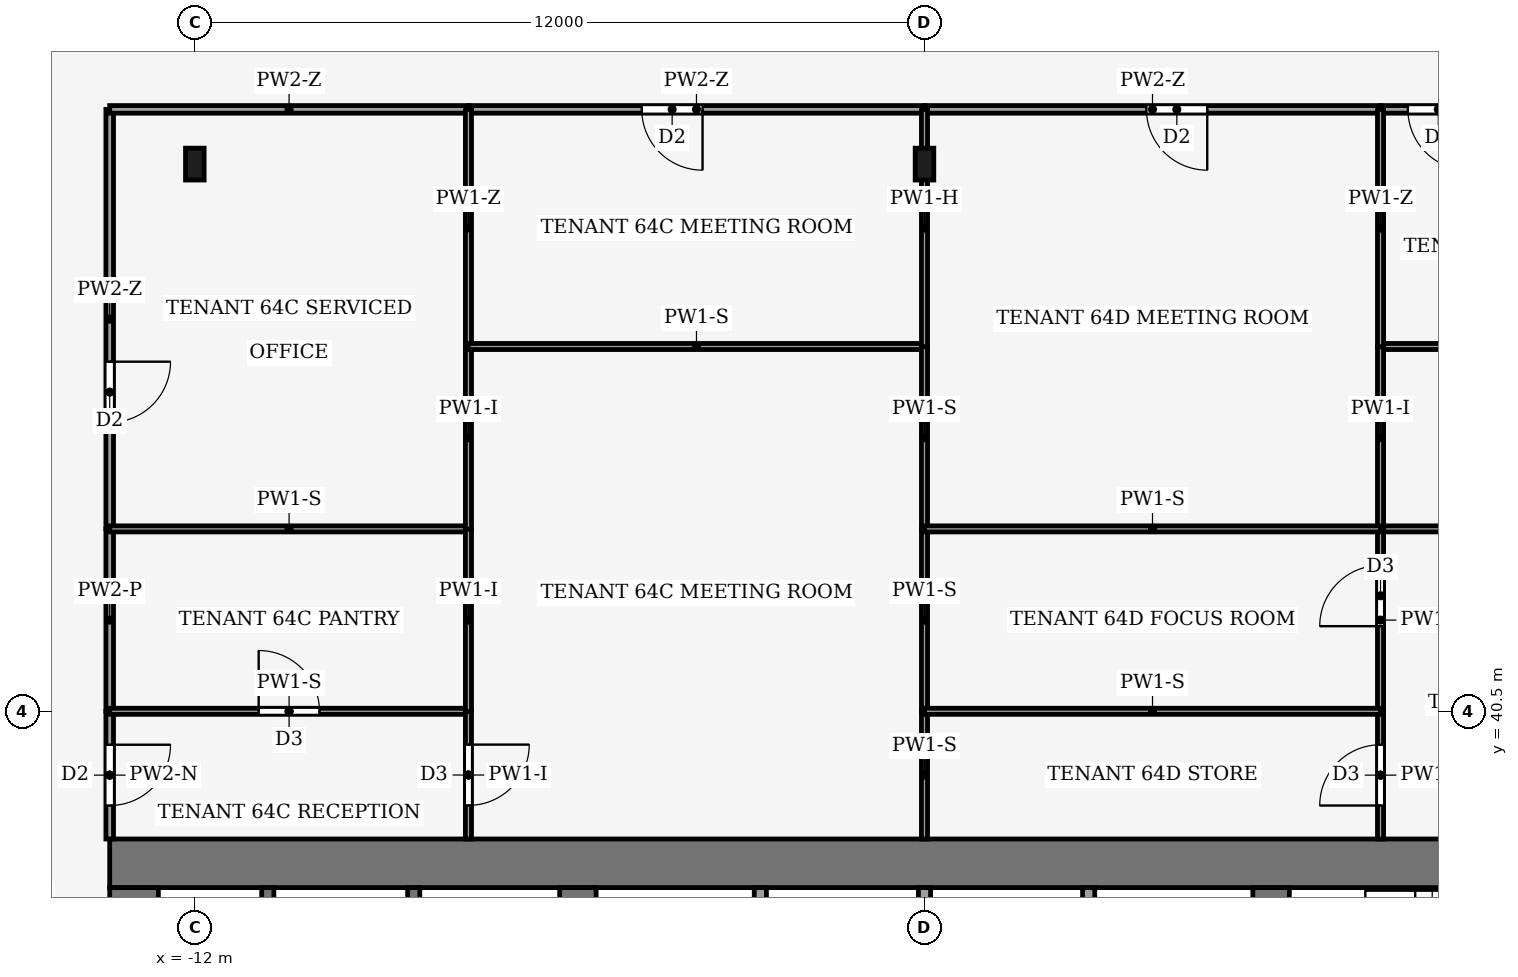
"""IFC4 building model, lengths in metres.
Left out: names, types, materials, properties, quantities, classifications, styles, units other than length and angle.
Written with IfcOpenShell. Run it as: python <this file> out.ifc"""

import sys

from ifc_helpers import new_model, si_unit, direction, frame, frame_2d, origin, origin_2d, place, context, subcontext, project, spatial, rectangle, i_section, extrude, element, fill, save


model = new_model("IFC4")
c1 = context("Model", 3, precision=1e-05, world=origin(), true_north=direction((0.0, 1.0)))
c2 = subcontext(c1, "Body", "Model", "MODEL_VIEW")
j1 = project(units=[si_unit("LENGTHUNIT", "METRE"), si_unit("PLANEANGLEUNIT", "RADIAN")], contexts=[c1])
p1 = place(None, origin())
s1 = spatial("IfcSite", under=j1, at=p1, CompositionType="ELEMENT")
p2 = place(p1, origin())
s2 = spatial("IfcBuilding", under=s1, at=p2, CompositionType="ELEMENT")
p3 = place(p2, frame((0.0, 0.0, 278.0)))
s3 = spatial("IfcBuildingStorey", under=s2, at=p3, CompositionType="ELEMENT", Elevation=278.0)
p4 = place(p3, frame((-13.4, 38.0, -0.13), z_axis=(0.0, 0.0, 1.0), x_axis=(1.0, 0.0, 0.0)))
e1 = element("IfcWall", 1, at=p4, inside=s3, PredefinedType="SHEAR", context=c2, shape_type="SweptSolid", body=[
    extrude(rectangle(XDim=26.8, YDim=0.8, at=frame_2d((13.4, 0.0))), origin(), (0.0, 0.0, 1.0), 3.88),
])
p5 = place(p3, frame((-13.0, 18.4, -0.13), z_axis=(0.0, 0.0, 1.0), x_axis=(0.0, 1.0, 0.0)))
e2 = element("IfcWall", 2, at=p5, inside=s3, PredefinedType="SHEAR", context=c2, shape_type="SweptSolid", body=[
    extrude(rectangle(XDim=19.2, YDim=0.8, at=frame_2d((9.6, 0.0))), origin(), (0.0, 0.0, 1.0), 3.88),
])
p6 = place(p5, frame((2.8, 0.0, 0.13)))
e3 = element("IfcOpeningElement", 3, at=p6, cuts=e2, PredefinedType="OPENING", context=c2, shape_type="SweptSolid", body=[
    extrude(rectangle(XDim=2.4, YDim=2.4, at=frame_2d((1.2, 1.2))), frame((0.0, 0.41, 0.0), z_axis=(0.0, -1.0, 0.0), x_axis=(1.0, 0.0, 0.0)), (0.0, 0.0, 1.0), 0.82),
])
p7 = place(p5, frame((13.4, 0.0, 0.13)))
e4 = element("IfcOpeningElement", 4, at=p7, cuts=e2, PredefinedType="OPENING", context=c2, shape_type="SweptSolid", body=[
    extrude(rectangle(XDim=1.4, YDim=2.2, at=frame_2d((0.7, 1.1))), frame((0.0, 0.41, 0.0), z_axis=(0.0, -1.0, 0.0), x_axis=(1.0, 0.0, 0.0)), (0.0, 0.0, 1.0), 0.82),
])
p8 = place(p3, frame((-5.7, 18.4, -0.13), z_axis=(0.0, 0.0, 1.0), x_axis=(0.0, 1.0, 0.0)))
e5 = element("IfcWall", 5, at=p8, inside=s3, PredefinedType="SHEAR", context=c2, shape_type="SweptSolid", body=[
    extrude(rectangle(XDim=19.2, YDim=0.6, at=frame_2d((9.6, 0.0))), origin(), (0.0, 0.0, 1.0), 3.88),
])
p9 = place(p8, frame((8.35, 0.0, 0.13)))
e6 = element("IfcOpeningElement", 6, at=p9, cuts=e5, PredefinedType="OPENING", context=c2, shape_type="SweptSolid", body=[
    extrude(rectangle(XDim=0.9, YDim=2.1, at=frame_2d((0.45, 1.05))), frame((0.0, 0.31, 0.0), z_axis=(0.0, -1.0, 0.0), x_axis=(1.0, 0.0, 0.0)), (0.0, 0.0, 1.0), 0.62),
])
p10 = place(p3, frame((5.7, 18.4, -0.13), z_axis=(0.0, 0.0, 1.0), x_axis=(0.0, 1.0, 0.0)))
e7 = element("IfcWall", 7, at=p10, inside=s3, PredefinedType="SHEAR", context=c2, shape_type="SweptSolid", body=[
    extrude(rectangle(XDim=19.2, YDim=0.6, at=frame_2d((9.6, 0.0))), origin(), (0.0, 0.0, 1.0), 3.88),
])
p11 = place(p10, frame((8.35, 0.0, 0.13)))
e8 = element("IfcOpeningElement", 8, at=p11, cuts=e7, PredefinedType="OPENING", context=c2, shape_type="SweptSolid", body=[
    extrude(rectangle(XDim=0.9, YDim=2.1, at=frame_2d((0.45, 1.05))), frame((0.0, 0.31, 0.0), z_axis=(0.0, -1.0, 0.0), x_axis=(1.0, 0.0, 0.0)), (0.0, 0.0, 1.0), 0.62),
])
p12 = place(p10, frame((13.3, 0.0, 0.13)))
e9 = element("IfcOpeningElement", 9, at=p12, cuts=e7, PredefinedType="OPENING", context=c2, shape_type="SweptSolid", body=[
    extrude(rectangle(XDim=2.4, YDim=2.4, at=frame_2d((1.2, 1.2))), frame((0.0, 0.31, 0.0), z_axis=(0.0, -1.0, 0.0), x_axis=(1.0, 0.0, 0.0)), (0.0, 0.0, 1.0), 0.62),
])
for number, where, z_axis, x_axis in (
    (10, (-12.0, 49.5, 0.0), (0.0, 0.0, 1.0), (1.0, 0.0, 0.0)),
    (11, (0.0, 49.5, 0.0), (0.0, 0.0, 1.0), (1.0, 0.0, 0.0)),
):
    element("IfcColumn", number, at=place(p3, frame(where, z_axis=z_axis, x_axis=x_axis)), inside=s3, PredefinedType="COLUMN", context=c2, shape_type="SweptSolid", body=[
        extrude(i_section(OverallWidth=0.306, OverallDepth=0.524, WebThickness=0.012, FlangeThickness=0.04, FilletRadius=0.027, at=origin_2d()), origin(), (0.0, 0.0, 1.0), 4.0),
    ])
for number, where, z_axis, x_axis in (
    (12, (-10.8, 34.0, 0.0), (0.0, 0.0, 1.0), (0.0, 1.0, 0.0)),
    (13, (-8.4, 34.0, 0.0), (0.0, 0.0, 1.0), (0.0, 1.0, 0.0)),
    (14, (-2.7, 34.0, 0.0), (0.0, 0.0, 1.0), (0.0, 1.0, 0.0)),
    (15, (0.0, 34.0, 0.0), (0.0, 0.0, 1.0), (0.0, 1.0, 0.0)),
    (16, (2.7, 34.0, 0.0), (0.0, 0.0, 1.0), (0.0, 1.0, 0.0)),
):
    element("IfcWall", number, at=place(p3, frame(where, z_axis=z_axis, x_axis=x_axis)), inside=s3, PredefinedType="PARTITIONING", context=c2, shape_type="SweptSolid", body=[
        extrude(rectangle(XDim=3.6, YDim=0.2, at=frame_2d((1.8, 0.0))), origin(), (0.0, 0.0, 1.0), 3.75),
    ])
p13 = place(p3, frame((-13.4, 40.5, 0.0), z_axis=(0.0, 0.0, 1.0), x_axis=(0.0, -1.0, 0.0)))
e17 = element("IfcWall", 17, at=p13, inside=s3, PredefinedType="PARTITIONING", context=c2, shape_type="SweptSolid", body=[
    extrude(rectangle(XDim=2.1, YDim=0.125, at=frame_2d((1.05, 0.0))), origin(), (0.0, 0.0, 1.0), 3.02),
])
p14 = place(p13, frame((0.55, 0.0, 0.0)))
e18 = element("IfcOpeningElement", 18, at=p14, cuts=e17, PredefinedType="OPENING", context=c2, shape_type="SweptSolid", body=[
    extrude(rectangle(XDim=1.0, YDim=2.1, at=frame_2d((0.5, 1.05))), frame((0.0, 0.073, 0.0), z_axis=(0.0, -1.0, 0.0), x_axis=(1.0, 0.0, 0.0)), (0.0, 0.0, 1.0), 0.145),
])
p15 = place(p3, frame((-13.4, 40.5, 0.0), z_axis=(0.0, 0.0, 1.0), x_axis=(0.0, 1.0, 0.0)))
e19 = element("IfcWall", 19, at=p15, inside=s3, PredefinedType="PARTITIONING", context=c2, shape_type="SweptSolid", body=[
    extrude(rectangle(XDim=3.0, YDim=0.125, at=frame_2d((1.5, 0.0))), origin(), (0.0, 0.0, 1.0), 3.75),
])
p16 = place(p3, frame((-13.4, 50.4, 0.0), z_axis=(0.0, 0.0, 1.0), x_axis=(0.0, -1.0, 0.0)))
e20 = element("IfcWall", 20, at=p16, inside=s3, PredefinedType="PARTITIONING", context=c2, shape_type="SweptSolid", body=[
    extrude(rectangle(XDim=6.9, YDim=0.125, at=frame_2d((3.45, 0.0))), origin(), (0.0, 0.0, 1.0), 3.12),
])
p17 = place(p16, frame((4.15, 0.0, 0.0)))
e21 = element("IfcOpeningElement", 21, at=p17, cuts=e20, PredefinedType="OPENING", context=c2, shape_type="SweptSolid", body=[
    extrude(rectangle(XDim=1.0, YDim=2.1, at=frame_2d((0.5, 1.05))), frame((0.0, 0.073, 0.0), z_axis=(0.0, -1.0, 0.0), x_axis=(1.0, 0.0, 0.0)), (0.0, 0.0, 1.0), 0.145),
])
p18 = place(p3, frame((-7.5, 50.4, 0.0), z_axis=(0.0, 0.0, 1.0), x_axis=(-1.0, 0.0, 0.0)))
e22 = element("IfcWall", 22, at=p18, inside=s3, PredefinedType="PARTITIONING", context=c2, shape_type="SweptSolid", body=[
    extrude(rectangle(XDim=5.9, YDim=0.125, at=frame_2d((2.95, 0.0))), origin(), (0.0, 0.0, 1.0), 3.12),
])
p19 = place(p3, frame((0.0, 50.4, 0.0), z_axis=(0.0, 0.0, 1.0), x_axis=(-1.0, 0.0, 0.0)))
e23 = element("IfcWall", 23, at=p19, inside=s3, PredefinedType="PARTITIONING", context=c2, shape_type="SweptSolid", body=[
    extrude(rectangle(XDim=7.5, YDim=0.125, at=frame_2d((3.75, 0.0))), origin(), (0.0, 0.0, 1.0), 3.12),
])
p20 = place(p19, frame((3.65, 0.0, 0.0)))
e24 = element("IfcOpeningElement", 24, at=p20, cuts=e23, PredefinedType="OPENING", context=c2, shape_type="SweptSolid", body=[
    extrude(rectangle(XDim=1.0, YDim=2.1, at=frame_2d((0.5, 1.05))), frame((0.0, 0.073, 0.0), z_axis=(0.0, -1.0, 0.0), x_axis=(1.0, 0.0, 0.0)), (0.0, 0.0, 1.0), 0.145),
])
p21 = place(p3, frame((13.4, 50.4, 0.0), z_axis=(0.0, 0.0, 1.0), x_axis=(-1.0, 0.0, 0.0)))
e25 = element("IfcWall", 25, at=p21, inside=s3, PredefinedType="PARTITIONING", context=c2, shape_type="SweptSolid", body=[
    extrude(rectangle(XDim=5.9, YDim=0.125, at=frame_2d((2.95, 0.0))), origin(), (0.0, 0.0, 1.0), 3.12),
])
p22 = place(p21, frame((4.45, 0.0, 0.0)))
e26 = element("IfcOpeningElement", 26, at=p22, cuts=e25, PredefinedType="OPENING", context=c2, shape_type="SweptSolid", body=[
    extrude(rectangle(XDim=1.0, YDim=2.1, at=frame_2d((0.5, 1.05))), frame((0.0, 0.073, 0.0), z_axis=(0.0, -1.0, 0.0), x_axis=(1.0, 0.0, 0.0)), (0.0, 0.0, 1.0), 0.145),
])
p23 = place(p3, frame((7.5, 50.4, 0.0), z_axis=(0.0, 0.0, 1.0), x_axis=(-1.0, 0.0, 0.0)))
e27 = element("IfcWall", 27, at=p23, inside=s3, PredefinedType="PARTITIONING", context=c2, shape_type="SweptSolid", body=[
    extrude(rectangle(XDim=7.5, YDim=0.125, at=frame_2d((3.75, 0.0))), origin(), (0.0, 0.0, 1.0), 3.12),
])
p24 = place(p23, frame((2.85, 0.0, 0.0)))
e28 = element("IfcOpeningElement", 28, at=p24, cuts=e27, PredefinedType="OPENING", context=c2, shape_type="SweptSolid", body=[
    extrude(rectangle(XDim=1.0, YDim=2.1, at=frame_2d((0.5, 1.05))), frame((0.0, 0.073, 0.0), z_axis=(0.0, -1.0, 0.0), x_axis=(1.0, 0.0, 0.0)), (0.0, 0.0, 1.0), 0.145),
])
p25 = place(p3, frame((-13.4, 40.5, 0.0), z_axis=(0.0, 0.0, 1.0), x_axis=(1.0, 0.0, 0.0)))
e29 = element("IfcWall", 29, at=p25, inside=s3, PredefinedType="PARTITIONING", context=c2, shape_type="SweptSolid", body=[
    extrude(rectangle(XDim=5.9, YDim=0.1, at=frame_2d((2.95, 0.0))), origin(), (0.0, 0.0, 1.0), 3.32),
])
p26 = place(p25, frame((2.45, 0.0, 0.0)))
e30 = element("IfcOpeningElement", 30, at=p26, cuts=e29, PredefinedType="OPENING", context=c2, shape_type="SweptSolid", body=[
    extrude(rectangle(XDim=1.0, YDim=2.1, at=frame_2d((0.5, 1.05))), frame((0.0, 0.06, 0.0), z_axis=(0.0, -1.0, 0.0), x_axis=(1.0, 0.0, 0.0)), (0.0, 0.0, 1.0), 0.12),
])
p27 = place(p3, frame((-7.5, 40.504, 0.0), z_axis=(0.0, 0.0, 1.0), x_axis=(0.0, -1.0, 0.0)))
e31 = element("IfcWall", 31, at=p27, inside=s3, PredefinedType="PARTITIONING", context=c2, shape_type="SweptSolid", body=[
    extrude(rectangle(XDim=2.104, YDim=0.1, at=frame_2d((1.052, 0.0))), origin(), (0.0, 0.0, 1.0), 3.75),
])
p28 = place(p27, frame((0.552, 0.0, 0.0)))
e32 = element("IfcOpeningElement", 32, at=p28, cuts=e31, PredefinedType="OPENING", context=c2, shape_type="SweptSolid", body=[
    extrude(rectangle(XDim=1.0, YDim=2.1, at=frame_2d((0.5, 1.05))), frame((0.0, 0.06, 0.0), z_axis=(0.0, -1.0, 0.0), x_axis=(1.0, 0.0, 0.0)), (0.0, 0.0, 1.0), 0.12),
])
p29 = place(p3, frame((-7.5, 43.5, 0.0), z_axis=(0.0, 0.0, 1.0), x_axis=(-1.0, 0.0, 0.0)))
e33 = element("IfcWall", 33, at=p29, inside=s3, PredefinedType="PARTITIONING", context=c2, shape_type="SweptSolid", body=[
    extrude(rectangle(XDim=5.9, YDim=0.1, at=frame_2d((2.95, 0.0))), origin(), (0.0, 0.0, 1.0), 3.32),
])
p30 = place(p3, frame((-7.5, 40.496, 0.0), z_axis=(0.0, 0.0, 1.0), x_axis=(0.0, 1.0, 0.0)))
e34 = element("IfcWall", 34, at=p30, inside=s3, PredefinedType="PARTITIONING", context=c2, shape_type="SweptSolid", body=[
    extrude(rectangle(XDim=3.008, YDim=0.1, at=frame_2d((1.504, 0.0))), origin(), (0.0, 0.0, 1.0), 3.75),
])
p31 = place(p3, frame((-7.5, 43.496, 0.0), z_axis=(0.0, 0.0, 1.0), x_axis=(0.0, 1.0, 0.0)))
e35 = element("IfcWall", 35, at=p31, inside=s3, PredefinedType="PARTITIONING", context=c2, shape_type="SweptSolid", body=[
    extrude(rectangle(XDim=3.004, YDim=0.1, at=frame_2d((1.502, 0.0))), origin(), (0.0, 0.0, 1.0), 3.75),
])
p32 = place(p3, frame((-7.5, 46.5, 0.0), z_axis=(0.0, 0.0, 1.0), x_axis=(0.0, 1.0, 0.0)))
e36 = element("IfcWall", 36, at=p32, inside=s3, PredefinedType="PARTITIONING", context=c2, shape_type="SweptSolid", body=[
    extrude(rectangle(XDim=3.9, YDim=0.1, at=frame_2d((1.95, 0.0))), origin(), (0.0, 0.0, 1.0), 3.12),
])
p33 = place(p3, frame((0.0, 46.5, 0.0), z_axis=(0.0, 0.0, 1.0), x_axis=(-1.0, 0.0, 0.0)))
e37 = element("IfcWall", 37, at=p33, inside=s3, PredefinedType="PARTITIONING", context=c2, shape_type="SweptSolid", body=[
    extrude(rectangle(XDim=7.5, YDim=0.1, at=frame_2d((3.75, 0.0))), origin(), (0.0, 0.0, 1.0), 3.32),
])
p34 = place(p3, frame((0.0, 38.4, 0.0), z_axis=(0.0, 0.0, 1.0), x_axis=(0.0, 1.0, 0.0)))
e38 = element("IfcWall", 38, at=p34, inside=s3, PredefinedType="PARTITIONING", context=c2, shape_type="SweptSolid", body=[
    extrude(rectangle(XDim=2.1, YDim=0.1, at=frame_2d((1.05, 0.0))), origin(), (0.0, 0.0, 1.0), 3.32),
])
p35 = place(p3, frame((0.0, 40.5, 0.0), z_axis=(0.0, 0.0, 1.0), x_axis=(0.0, 1.0, 0.0)))
e39 = element("IfcWall", 39, at=p35, inside=s3, PredefinedType="PARTITIONING", context=c2, shape_type="SweptSolid", body=[
    extrude(rectangle(XDim=3.0, YDim=0.1, at=frame_2d((1.5, 0.0))), origin(), (0.0, 0.0, 1.0), 3.32),
])
p36 = place(p3, frame((0.0, 43.5, 0.0), z_axis=(0.0, 0.0, 1.0), x_axis=(0.0, 1.0, 0.0)))
e40 = element("IfcWall", 40, at=p36, inside=s3, PredefinedType="PARTITIONING", context=c2, shape_type="SweptSolid", body=[
    extrude(rectangle(XDim=3.004, YDim=0.1, at=frame_2d((1.502, 0.0))), origin(), (0.0, 0.0, 1.0), 3.32),
])
p37 = place(p3, frame((0.0, 46.496, 0.0), z_axis=(0.0, 0.0, 1.0), x_axis=(0.0, 1.0, 0.0)))
e41 = element("IfcWall", 41, at=p37, inside=s3, PredefinedType="PARTITIONING", context=c2, shape_type="SweptSolid", body=[
    extrude(rectangle(XDim=3.904, YDim=0.1, at=frame_2d((1.952, 0.0))), origin(), (0.0, 0.0, 1.0), 3.17),
])
p38 = place(p3, frame((7.5, 43.5, 0.0), z_axis=(0.0, 0.0, 1.0), x_axis=(1.0, 0.0, 0.0)))
e42 = element("IfcWall", 42, at=p38, inside=s3, PredefinedType="PARTITIONING", context=c2, shape_type="SweptSolid", body=[
    extrude(rectangle(XDim=5.9, YDim=0.1, at=frame_2d((2.95, 0.0))), origin(), (0.0, 0.0, 1.0), 3.32),
])
p39 = place(p38, frame((2.45, 0.0, 0.0)))
e43 = element("IfcOpeningElement", 43, at=p39, cuts=e42, PredefinedType="OPENING", context=c2, shape_type="SweptSolid", body=[
    extrude(rectangle(XDim=1.0, YDim=2.1, at=frame_2d((0.5, 1.05))), frame((0.0, 0.06, 0.0), z_axis=(0.0, -1.0, 0.0), x_axis=(1.0, 0.0, 0.0)), (0.0, 0.0, 1.0), 0.12),
])
p40 = place(p3, frame((7.5, 38.4, 0.0), z_axis=(0.0, 0.0, 1.0), x_axis=(0.0, 1.0, 0.0)))
e44 = element("IfcWall", 44, at=p40, inside=s3, PredefinedType="PARTITIONING", context=c2, shape_type="SweptSolid", body=[
    extrude(rectangle(XDim=2.1, YDim=0.1, at=frame_2d((1.05, 0.0))), origin(), (0.0, 0.0, 1.0), 3.75),
])
p41 = place(p40, frame((0.55, 0.0, 0.0)))
e45 = element("IfcOpeningElement", 45, at=p41, cuts=e44, PredefinedType="OPENING", context=c2, shape_type="SweptSolid", body=[
    extrude(rectangle(XDim=1.0, YDim=2.1, at=frame_2d((0.5, 1.05))), frame((0.0, 0.06, 0.0), z_axis=(0.0, -1.0, 0.0), x_axis=(1.0, 0.0, 0.0)), (0.0, 0.0, 1.0), 0.12),
])
p42 = place(p3, frame((7.5, 40.5, 0.0), z_axis=(0.0, 0.0, 1.0), x_axis=(0.0, 1.0, 0.0)))
e46 = element("IfcWall", 46, at=p42, inside=s3, PredefinedType="PARTITIONING", context=c2, shape_type="SweptSolid", body=[
    extrude(rectangle(XDim=3.0, YDim=0.1, at=frame_2d((1.5, 0.0))), origin(), (0.0, 0.0, 1.0), 3.75),
])
p43 = place(p42, frame((1.4, 0.0, 0.0)))
e47 = element("IfcOpeningElement", 47, at=p43, cuts=e46, PredefinedType="OPENING", context=c2, shape_type="SweptSolid", body=[
    extrude(rectangle(XDim=1.0, YDim=2.1, at=frame_2d((0.5, 1.05))), frame((0.0, 0.06, 0.0), z_axis=(0.0, -1.0, 0.0), x_axis=(1.0, 0.0, 0.0)), (0.0, 0.0, 1.0), 0.12),
])
p44 = place(p3, frame((13.4, 46.5, 0.0), z_axis=(0.0, 0.0, 1.0), x_axis=(-1.0, 0.0, 0.0)))
e48 = element("IfcWall", 48, at=p44, inside=s3, PredefinedType="PARTITIONING", context=c2, shape_type="SweptSolid", body=[
    extrude(rectangle(XDim=5.9, YDim=0.1, at=frame_2d((2.95, 0.0))), origin(), (0.0, 0.0, 1.0), 3.32),
])
p45 = place(p3, frame((7.5, 46.504, 0.0), z_axis=(0.0, 0.0, 1.0), x_axis=(0.0, -1.0, 0.0)))
e49 = element("IfcWall", 49, at=p45, inside=s3, PredefinedType="PARTITIONING", context=c2, shape_type="SweptSolid", body=[
    extrude(rectangle(XDim=3.004, YDim=0.1, at=frame_2d((1.502, 0.0))), origin(), (0.0, 0.0, 1.0), 3.75),
])
p46 = place(p3, frame((7.5, 50.4, 0.0), z_axis=(0.0, 0.0, 1.0), x_axis=(0.0, -1.0, 0.0)))
e50 = element("IfcWall", 50, at=p46, inside=s3, PredefinedType="PARTITIONING", context=c2, shape_type="SweptSolid", body=[
    extrude(rectangle(XDim=3.904, YDim=0.1, at=frame_2d((1.952, 0.0))), origin(), (0.0, 0.0, 1.0), 3.12),
])
for number, where, z_axis, x_axis in (
    (51, (7.5, 40.5, 0.0), (0.0, 0.0, 1.0), (-1.0, 0.0, 0.0)),
    (52, (7.5, 43.5, 0.0), (0.0, 0.0, 1.0), (-1.0, 0.0, 0.0)),
):
    element("IfcWall", number, at=place(p3, frame(where, z_axis=z_axis, x_axis=x_axis)), inside=s3, PredefinedType="PARTITIONING", context=c2, shape_type="SweptSolid", body=[
        extrude(rectangle(XDim=7.5, YDim=0.1, at=frame_2d((3.75, 0.0))), origin(), (0.0, 0.0, 1.0), 3.32),
    ])
p47 = place(p14, origin())
e53 = element("IfcDoor", 53, at=p47, inside=s3, OperationType="SINGLE_SWING_LEFT", PredefinedType="DOOR", context=c2, shape_type="SweptSolid", body=[
    extrude(rectangle(XDim=1.0, YDim=2.1, at=frame_2d((0.5, 1.05))), frame((0.0, 0.025, 0.0), z_axis=(0.0, -1.0, 0.0), x_axis=(1.0, 0.0, 0.0)), (0.0, 0.0, 1.0), 0.05),
])
fill(e18, e53)
p48 = place(p17, origin())
e54 = element("IfcDoor", 54, at=p48, inside=s3, OperationType="SINGLE_SWING_RIGHT", PredefinedType="DOOR", context=c2, shape_type="SweptSolid", body=[
    extrude(rectangle(XDim=1.0, YDim=2.1, at=frame_2d((0.5, 1.05))), frame((0.0, 0.025, 0.0), z_axis=(0.0, -1.0, 0.0), x_axis=(1.0, 0.0, 0.0)), (0.0, 0.0, 1.0), 0.05),
])
fill(e21, e54)
p49 = place(p20, origin())
e55 = element("IfcDoor", 55, at=p49, inside=s3, OperationType="SINGLE_SWING_RIGHT", PredefinedType="DOOR", context=c2, shape_type="SweptSolid", body=[
    extrude(rectangle(XDim=1.0, YDim=2.1, at=frame_2d((0.5, 1.05))), frame((0.0, 0.025, 0.0), z_axis=(0.0, -1.0, 0.0), x_axis=(1.0, 0.0, 0.0)), (0.0, 0.0, 1.0), 0.05),
])
fill(e24, e55)
p50 = place(p22, origin())
e56 = element("IfcDoor", 56, at=p50, inside=s3, OperationType="SINGLE_SWING_RIGHT", PredefinedType="DOOR", context=c2, shape_type="SweptSolid", body=[
    extrude(rectangle(XDim=1.0, YDim=2.1, at=frame_2d((0.5, 1.05))), frame((0.0, 0.025, 0.0), z_axis=(0.0, -1.0, 0.0), x_axis=(1.0, 0.0, 0.0)), (0.0, 0.0, 1.0), 0.05),
])
fill(e26, e56)
p51 = place(p24, origin())
e57 = element("IfcDoor", 57, at=p51, inside=s3, OperationType="SINGLE_SWING_LEFT", PredefinedType="DOOR", context=c2, shape_type="SweptSolid", body=[
    extrude(rectangle(XDim=1.0, YDim=2.1, at=frame_2d((0.5, 1.05))), frame((0.0, 0.025, 0.0), z_axis=(0.0, -1.0, 0.0), x_axis=(1.0, 0.0, 0.0)), (0.0, 0.0, 1.0), 0.05),
])
fill(e28, e57)
p52 = place(p26, origin())
e58 = element("IfcDoor", 58, at=p52, inside=s3, OperationType="SINGLE_SWING_LEFT", PredefinedType="DOOR", context=c2, shape_type="SweptSolid", body=[
    extrude(rectangle(XDim=1.0, YDim=2.1, at=frame_2d((0.5, 1.05))), frame((0.0, 0.025, 0.0), z_axis=(0.0, -1.0, 0.0), x_axis=(1.0, 0.0, 0.0)), (0.0, 0.0, 1.0), 0.05),
])
fill(e30, e58)
p53 = place(p28, origin())
e59 = element("IfcDoor", 59, at=p53, inside=s3, OperationType="SINGLE_SWING_RIGHT", PredefinedType="DOOR", context=c2, shape_type="SweptSolid", body=[
    extrude(rectangle(XDim=1.0, YDim=2.1, at=frame_2d((0.5, 1.05))), frame((0.0, 0.025, 0.0), z_axis=(0.0, -1.0, 0.0), x_axis=(1.0, 0.0, 0.0)), (0.0, 0.0, 1.0), 0.05),
])
fill(e32, e59)
p54 = place(p41, origin())
e60 = element("IfcDoor", 60, at=p54, inside=s3, OperationType="SINGLE_SWING_RIGHT", PredefinedType="DOOR", context=c2, shape_type="SweptSolid", body=[
    extrude(rectangle(XDim=1.0, YDim=2.1, at=frame_2d((0.5, 1.05))), frame((0.0, 0.025, 0.0), z_axis=(0.0, -1.0, 0.0), x_axis=(1.0, 0.0, 0.0)), (0.0, 0.0, 1.0), 0.05),
])
fill(e45, e60)
p55 = place(p43, origin())
e61 = element("IfcDoor", 61, at=p55, inside=s3, OperationType="SINGLE_SWING_RIGHT", PredefinedType="DOOR", context=c2, shape_type="SweptSolid", body=[
    extrude(rectangle(XDim=1.0, YDim=2.1, at=frame_2d((0.5, 1.05))), frame((0.0, 0.025, 0.0), z_axis=(0.0, -1.0, 0.0), x_axis=(1.0, 0.0, 0.0)), (0.0, 0.0, 1.0), 0.05),
])
fill(e47, e61)
save(model, sys.argv[1])
